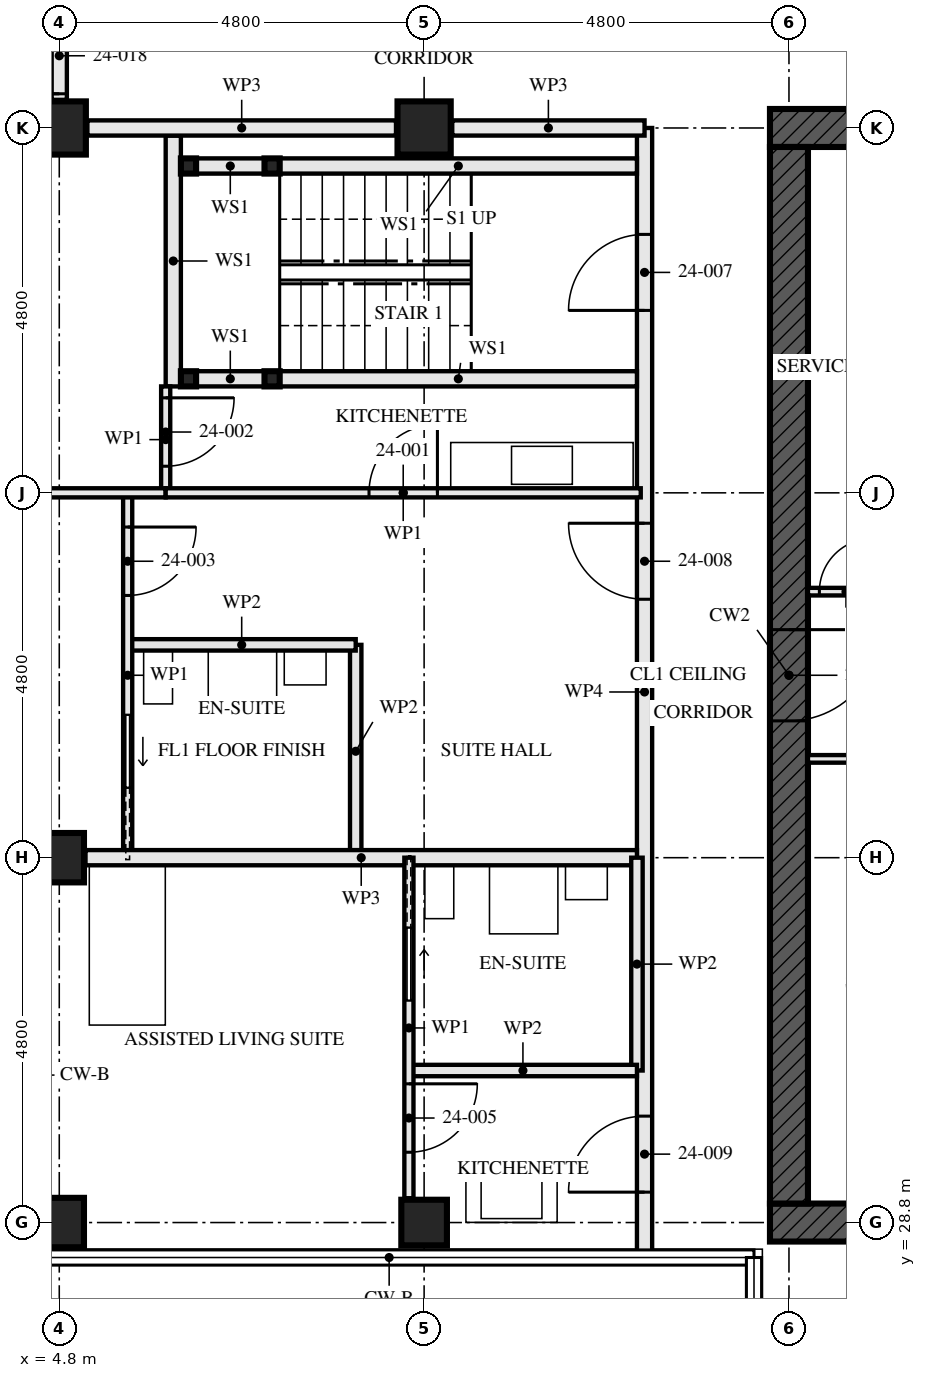
"""IFC4 building model, lengths in metres.
Left out: names, types, materials, properties, quantities, classifications, styles, units other than length and angle.
Written with IfcOpenShell. Run it as: python <this file> out.ifc"""

import sys

from ifc_helpers import new_model, si_unit, direction, frame, frame_2d, origin, origin_2d, place, context, subcontext, project, spatial, rectangle, hollow_rectangle, extrude, element, fill, save


model = new_model("IFC4")
c1 = context("Model", 3, precision=1e-05, world=origin(), true_north=direction((0.0, 1.0)))
c2 = subcontext(c1, "Body", "Model", "MODEL_VIEW")
j1 = project(units=[si_unit("LENGTHUNIT", "METRE"), si_unit("PLANEANGLEUNIT", "RADIAN")], contexts=[c1])
p1 = place(None, origin())
s1 = spatial("IfcSite", under=j1, at=p1, CompositionType="ELEMENT")
p2 = place(p1, origin())
s2 = spatial("IfcBuilding", under=s1, at=p2, CompositionType="ELEMENT")
p3 = place(p2, frame((0.0, 0.0, 91.0)))
s3 = spatial("IfcBuildingStorey", under=s2, at=p3, CompositionType="ELEMENT", Elevation=91.0)
for number, where, z_axis, x_axis in (
    (1, (4.8, 28.8, 0.0), (0.0, 0.0, 1.0), (0.0, 1.0, 0.0)),
    (2, (4.8, 33.6, 0.0), (0.0, 0.0, 1.0), (0.0, 1.0, 0.0)),
):
    element("IfcColumn", number, at=place(p3, frame(where, z_axis=z_axis, x_axis=x_axis)), inside=s3, PredefinedType="COLUMN", context=c2, shape_type="SweptSolid", body=[
        extrude(hollow_rectangle(XDim=0.65, YDim=0.65, WallThickness=0.08, at=origin_2d()), origin(), (0.0, 0.0, 1.0), 3.5),
    ])
p4 = place(p3, frame((4.8, 43.2, 0.0), z_axis=(0.0, 0.0, 1.0), x_axis=(0.0, 1.0, 0.0)))
e3 = element("IfcColumn", 3, at=p4, inside=s3, PredefinedType="COLUMN", context=c2, shape_type="SweptSolid", body=[
    extrude(hollow_rectangle(XDim=0.7, YDim=0.7, WallThickness=0.06, at=origin_2d()), origin(), (0.0, 0.0, 1.0), 3.5),
])
p5 = place(p3, frame((9.6, 28.8, 0.0), z_axis=(0.0, 0.0, 1.0), x_axis=(0.0, 1.0, 0.0)))
e4 = element("IfcColumn", 4, at=p5, inside=s3, PredefinedType="COLUMN", context=c2, shape_type="SweptSolid", body=[
    extrude(hollow_rectangle(XDim=0.6, YDim=0.6, WallThickness=0.08, at=origin_2d()), origin(), (0.0, 0.0, 1.0), 3.5),
])
p6 = place(p3, frame((9.6, 43.2, 0.0), z_axis=(0.0, 0.0, 1.0), x_axis=(0.0, 1.0, 0.0)))
e5 = element("IfcColumn", 5, at=p6, inside=s3, PredefinedType="COLUMN", context=c2, shape_type="SweptSolid", body=[
    extrude(hollow_rectangle(XDim=0.7, YDim=0.7, WallThickness=0.06, at=origin_2d()), origin(), (0.0, 0.0, 1.0), 3.5),
])
p7 = place(p3, frame((14.15, 28.8, -0.17), z_axis=(0.0, 0.0, 1.0), x_axis=(1.0, 0.0, 0.0)))
e6 = element("IfcWall", 6, at=p7, inside=s3, PredefinedType="SHEAR", context=c2, shape_type="SweptSolid", body=[
    extrude(rectangle(XDim=14.9, YDim=0.5, at=frame_2d((7.45, 0.0))), origin(), (0.0, 0.0, 1.0), 3.5),
])
p8 = place(p7, frame((6.85, 0.0, 0.17)))
e7 = element("IfcOpeningElement", 7, at=p8, cuts=e6, PredefinedType="OPENING", context=c2, shape_type="SweptSolid", body=[
    extrude(rectangle(XDim=1.2, YDim=2.1, at=frame_2d((0.6, 1.05))), frame((0.0, 0.26, 0.0), z_axis=(0.0, -1.0, 0.0), x_axis=(1.0, 0.0, 0.0)), (0.0, 0.0, 1.0), 0.521),
])
p9 = place(p3, frame((29.05, 43.2, -0.17), z_axis=(0.0, 0.0, 1.0), x_axis=(-1.0, 0.0, 0.0)))
e8 = element("IfcWall", 8, at=p9, inside=s3, PredefinedType="SHEAR", context=c2, shape_type="SweptSolid", body=[
    extrude(rectangle(XDim=14.9, YDim=0.5, at=frame_2d((7.45, 0.0))), origin(), (0.0, 0.0, 1.0), 3.5),
])
p10 = place(p9, frame((6.85, 0.0, 0.17)))
e9 = element("IfcOpeningElement", 9, at=p10, cuts=e8, PredefinedType="OPENING", context=c2, shape_type="SweptSolid", body=[
    extrude(rectangle(XDim=1.2, YDim=2.1, at=frame_2d((0.6, 1.05))), frame((0.0, 0.26, 0.0), z_axis=(0.0, -1.0, 0.0), x_axis=(1.0, 0.0, 0.0)), (0.0, 0.0, 1.0), 0.521),
])
p11 = place(p3, frame((14.4, 42.95, -0.17), z_axis=(0.0, 0.0, 1.0), x_axis=(0.0, -1.0, 0.0)))
e10 = element("IfcWall", 10, at=p11, inside=s3, PredefinedType="SHEAR", context=c2, shape_type="SweptSolid", body=[
    extrude(rectangle(XDim=13.9, YDim=0.5, at=frame_2d((6.95, 0.0))), origin(), (0.0, 0.0, 1.0), 3.5),
])
p12 = place(p11, frame((6.35, 0.0, 0.17)))
e11 = element("IfcOpeningElement", 11, at=p12, cuts=e10, PredefinedType="OPENING", context=c2, shape_type="SweptSolid", body=[
    extrude(rectangle(XDim=1.2, YDim=2.1, at=frame_2d((0.6, 1.05))), frame((0.0, 0.26, 0.0), z_axis=(0.0, -1.0, 0.0), x_axis=(1.0, 0.0, 0.0)), (0.0, 0.0, 1.0), 0.521),
])
for number, where, z_axis, x_axis in (
    (12, (6.5, 42.7, 0.0), (0.0, 0.0, 1.0), (1.0, 0.0, 0.0)),
    (13, (6.5, 39.9, 0.0), (0.0, 0.0, 1.0), (1.0, 0.0, 0.0)),
    (14, (7.6, 42.7, 0.0), (0.0, 0.0, 1.0), (1.0, 0.0, 0.0)),
    (15, (7.6, 39.9, 0.0), (0.0, 0.0, 1.0), (1.0, 0.0, 0.0)),
):
    element("IfcColumn", number, at=place(p3, frame(where, z_axis=z_axis, x_axis=x_axis)), inside=s3, PredefinedType="COLUMN", context=c2, shape_type="SweptSolid", body=[
        extrude(hollow_rectangle(XDim=0.2, YDim=0.2, WallThickness=0.008, at=origin_2d()), origin(), (0.0, 0.0, 1.0), 3.33),
    ])
p13 = place(p3, frame((6.6, 42.7, 0.0), z_axis=(0.0, 0.0, 1.0), x_axis=(1.0, 0.0, 0.0)))
e16 = element("IfcWall", 16, at=p13, inside=s3, PredefinedType="SOLIDWALL", context=c2, shape_type="SweptSolid", body=[
    extrude(rectangle(XDim=0.9, YDim=0.2, at=frame_2d((0.45, 0.0))), origin(), (0.0, 0.0, 1.0), 2.99),
])
p14 = place(p3, frame((7.7, 42.7, 0.0), z_axis=(0.0, 0.0, 1.0), x_axis=(1.0, 0.0, 0.0)))
e17 = element("IfcWall", 17, at=p14, inside=s3, PredefinedType="SOLIDWALL", context=c2, shape_type="SweptSolid", body=[
    extrude(rectangle(XDim=4.7, YDim=0.2, at=frame_2d((2.35, 0.0))), origin(), (0.0, 0.0, 1.0), 2.99),
])
p15 = place(p3, frame((6.6, 39.9, 0.0), z_axis=(0.0, 0.0, 1.0), x_axis=(1.0, 0.0, 0.0)))
e18 = element("IfcWall", 18, at=p15, inside=s3, PredefinedType="SOLIDWALL", context=c2, shape_type="SweptSolid", body=[
    extrude(rectangle(XDim=0.9, YDim=0.2, at=frame_2d((0.45, 0.0))), origin(), (0.0, 0.0, 1.0), 2.99),
])
p16 = place(p3, frame((7.7, 39.9, 0.0), z_axis=(0.0, 0.0, 1.0), x_axis=(1.0, 0.0, 0.0)))
e19 = element("IfcWall", 19, at=p16, inside=s3, PredefinedType="SOLIDWALL", context=c2, shape_type="SweptSolid", body=[
    extrude(rectangle(XDim=4.7, YDim=0.2, at=frame_2d((2.35, 0.0))), origin(), (0.0, 0.0, 1.0), 2.99),
])
p17 = place(p3, frame((6.3, 43.1, 0.0), z_axis=(0.0, 0.0, 1.0), x_axis=(0.0, -1.0, 0.0)))
e20 = element("IfcWall", 20, at=p17, inside=s3, PredefinedType="SOLIDWALL", context=c2, shape_type="SweptSolid", body=[
    extrude(rectangle(XDim=3.3, YDim=0.2, at=frame_2d((1.65, 0.0))), origin(), (0.0, 0.0, 1.0), 3.33),
])
p18 = place(p3, frame((5.7, 36.4, 0.0), z_axis=(0.0, 0.0, 1.0), x_axis=(1.0, 0.0, 0.0)))
e21 = element("IfcWall", 21, at=p18, inside=s3, PredefinedType="PARTITIONING", context=c2, shape_type="SweptSolid", body=[
    extrude(rectangle(XDim=3.0, YDim=0.15, at=frame_2d((1.5, 0.0))), origin(), (0.0, 0.0, 1.0), 3.33),
])
p19 = place(p3, frame((8.7, 36.4, 0.0), z_axis=(0.0, 0.0, 1.0), x_axis=(0.0, -1.0, 0.0)))
e22 = element("IfcWall", 22, at=p19, inside=s3, PredefinedType="PARTITIONING", context=c2, shape_type="SweptSolid", body=[
    extrude(rectangle(XDim=2.8, YDim=0.15, at=frame_2d((1.4, 0.0))), origin(), (0.0, 0.0, 1.0), 3.33),
])
p20 = place(p3, frame((6.2, 38.4, 0.0), z_axis=(0.0, 0.0, 1.0), x_axis=(1.0, 0.0, 0.0)))
e23 = element("IfcWall", 23, at=p20, inside=s3, PredefinedType="PARTITIONING", context=c2, shape_type="SweptSolid", body=[
    extrude(rectangle(XDim=6.25, YDim=0.12, at=frame_2d((3.125, 0.0))), origin(), (0.0, 0.0, 1.0), 2.55),
])
p21 = place(p20, frame((2.675, 0.0, 0.0)))
e24 = element("IfcOpeningElement", 24, at=p21, cuts=e23, PredefinedType="OPENING", context=c2, shape_type="SweptSolid", body=[
    extrude(rectangle(XDim=0.9, YDim=2.1, at=frame_2d((0.45, 1.05))), frame((0.0, 0.071, 0.0), z_axis=(0.0, -1.0, 0.0), x_axis=(1.0, 0.0, 0.0)), (0.0, 0.0, 1.0), 0.141),
])
p22 = place(p3, frame((6.2, 39.8, 0.0), z_axis=(0.0, 0.0, 1.0), x_axis=(0.0, -1.0, 0.0)))
e25 = element("IfcWall", 25, at=p22, inside=s3, PredefinedType="PARTITIONING", context=c2, shape_type="SweptSolid", body=[
    extrude(rectangle(XDim=1.4, YDim=0.12, at=frame_2d((0.7, 0.0))), origin(), (0.0, 0.0, 1.0), 3.33),
])
p23 = place(p22, frame((0.15, 0.0, 0.0)))
e26 = element("IfcOpeningElement", 26, at=p23, cuts=e25, PredefinedType="OPENING", context=c2, shape_type="SweptSolid", body=[
    extrude(rectangle(XDim=0.9, YDim=2.1, at=frame_2d((0.45, 1.05))), frame((0.0, 0.071, 0.0), z_axis=(0.0, -1.0, 0.0), x_axis=(1.0, 0.0, 0.0)), (0.0, 0.0, 1.0), 0.141),
])
p24 = place(p3, frame((5.7, 38.4, 0.0), z_axis=(0.0, 0.0, 1.0), x_axis=(0.0, -1.0, 0.0)))
e27 = element("IfcWall", 27, at=p24, inside=s3, PredefinedType="PARTITIONING", context=c2, shape_type="SweptSolid", body=[
    extrude(rectangle(XDim=4.8, YDim=0.12, at=frame_2d((2.4, 0.0))), origin(), (0.0, 0.0, 1.0), 3.33),
])
p25 = place(p24, frame((0.45, 0.0, 0.0)))
e28 = element("IfcOpeningElement", 28, at=p25, cuts=e27, PredefinedType="OPENING", context=c2, shape_type="SweptSolid", body=[
    extrude(rectangle(XDim=0.9, YDim=2.1, at=frame_2d((0.45, 1.05))), frame((0.0, 0.071, 0.0), z_axis=(0.0, -1.0, 0.0), x_axis=(1.0, 0.0, 0.0)), (0.0, 0.0, 1.0), 0.141),
])
p26 = place(p24, frame((2.925, 0.0, 0.0)))
e29 = element("IfcOpeningElement", 29, at=p26, cuts=e27, PredefinedType="OPENING", context=c2, shape_type="SweptSolid", body=[
    extrude(rectangle(XDim=0.95, YDim=2.1, at=frame_2d((0.475, 1.05))), frame((0.0, 0.071, 0.0), z_axis=(0.0, -1.0, 0.0), x_axis=(1.0, 0.0, 0.0)), (0.0, 0.0, 1.0), 0.141),
])
p27 = place(p3, frame((0.345, 38.4, 0.0), z_axis=(0.0, 0.0, 1.0), x_axis=(1.0, 0.0, 0.0)))
e30 = element("IfcWall", 30, at=p27, inside=s3, PredefinedType="PARTITIONING", context=c2, shape_type="SweptSolid", body=[
    extrude(rectangle(XDim=5.855, YDim=0.12, at=frame_2d((2.927, 0.0))), origin(), (0.0, 0.0, 1.0), 2.55),
])
p28 = place(p3, frame((5.145, 33.6, 0.0), z_axis=(0.0, 0.0, 1.0), x_axis=(1.0, 0.0, 0.0)))
e31 = element("IfcWall", 31, at=p28, inside=s3, PredefinedType="PARTITIONING", context=c2, shape_type="SweptSolid", body=[
    extrude(rectangle(XDim=7.255, YDim=0.2, at=frame_2d((3.627, 0.0))), origin(), (0.0, 0.0, 1.0), 2.55),
])
p29 = place(p3, frame((9.4, 30.8, 0.0), z_axis=(0.0, 0.0, 1.0), x_axis=(1.0, 0.0, 0.0)))
e32 = element("IfcWall", 32, at=p29, inside=s3, PredefinedType="PARTITIONING", context=c2, shape_type="SweptSolid", body=[
    extrude(rectangle(XDim=3.0, YDim=0.15, at=frame_2d((1.5, 0.0))), origin(), (0.0, 0.0, 1.0), 3.33),
])
p30 = place(p3, frame((12.4, 33.6, 0.0), z_axis=(0.0, 0.0, 1.0), x_axis=(0.0, -1.0, 0.0)))
e33 = element("IfcWall", 33, at=p30, inside=s3, PredefinedType="PARTITIONING", context=c2, shape_type="SweptSolid", body=[
    extrude(rectangle(XDim=2.8, YDim=0.15, at=frame_2d((1.4, 0.0))), origin(), (0.0, 0.0, 1.0), 3.33),
])
p31 = place(p3, frame((9.4, 33.6, 0.0), z_axis=(0.0, 0.0, 1.0), x_axis=(0.0, -1.0, 0.0)))
e34 = element("IfcWall", 34, at=p31, inside=s3, PredefinedType="PARTITIONING", context=c2, shape_type="SweptSolid", body=[
    extrude(rectangle(XDim=4.48, YDim=0.12, at=frame_2d((2.24, 0.0))), origin(), (0.0, 0.0, 1.0), 3.33),
])
p32 = place(p31, frame((2.975, 0.0, 0.0)))
e35 = element("IfcOpeningElement", 35, at=p32, cuts=e34, PredefinedType="OPENING", context=c2, shape_type="SweptSolid", body=[
    extrude(rectangle(XDim=0.9, YDim=2.1, at=frame_2d((0.45, 1.05))), frame((0.0, 0.071, 0.0), z_axis=(0.0, -1.0, 0.0), x_axis=(1.0, 0.0, 0.0)), (0.0, 0.0, 1.0), 0.141),
])
p33 = place(p31, frame((0.925, 0.0, 0.0)))
e36 = element("IfcOpeningElement", 36, at=p33, cuts=e34, PredefinedType="OPENING", context=c2, shape_type="SweptSolid", body=[
    extrude(rectangle(XDim=0.95, YDim=2.1, at=frame_2d((0.475, 1.05))), frame((0.0, 0.071, 0.0), z_axis=(0.0, -1.0, 0.0), x_axis=(1.0, 0.0, 0.0)), (0.0, 0.0, 1.0), 0.141),
])
p34 = place(p3, frame((12.5, 43.2, 0.0), z_axis=(0.0, 0.0, 1.0), x_axis=(0.0, -1.0, 0.0)))
e37 = element("IfcWall", 37, at=p34, inside=s3, PredefinedType="PARTITIONING", context=c2, shape_type="SweptSolid", body=[
    extrude(rectangle(XDim=14.84, YDim=0.2, at=frame_2d((7.42, 0.0))), origin(), (0.0, 0.0, 1.0), 2.32),
])
p35 = place(p34, frame((1.4, 0.0, 0.0)))
e38 = element("IfcOpeningElement", 38, at=p35, cuts=e37, PredefinedType="OPENING", context=c2, shape_type="SweptSolid", body=[
    extrude(rectangle(XDim=1.0, YDim=2.1, at=frame_2d((0.5, 1.05))), frame((0.0, 0.111, 0.0), z_axis=(0.0, -1.0, 0.0), x_axis=(1.0, 0.0, 0.0)), (0.0, 0.0, 1.0), 0.221),
])
p36 = place(p34, frame((5.2, 0.0, 0.0)))
e39 = element("IfcOpeningElement", 39, at=p36, cuts=e37, PredefinedType="OPENING", context=c2, shape_type="SweptSolid", body=[
    extrude(rectangle(XDim=1.0, YDim=2.1, at=frame_2d((0.5, 1.05))), frame((0.0, 0.111, 0.0), z_axis=(0.0, -1.0, 0.0), x_axis=(1.0, 0.0, 0.0)), (0.0, 0.0, 1.0), 0.221),
])
p37 = place(p34, frame((13.0, 0.0, 0.0)))
e40 = element("IfcOpeningElement", 40, at=p37, cuts=e37, PredefinedType="OPENING", context=c2, shape_type="SweptSolid", body=[
    extrude(rectangle(XDim=1.0, YDim=2.1, at=frame_2d((0.5, 1.05))), frame((0.0, 0.111, 0.0), z_axis=(0.0, -1.0, 0.0), x_axis=(1.0, 0.0, 0.0)), (0.0, 0.0, 1.0), 0.221),
])
p38 = place(p3, frame((4.8, 45.2, 0.0), z_axis=(0.0, 0.0, 1.0), x_axis=(0.0, -1.0, 0.0)))
e41 = element("IfcWall", 41, at=p38, inside=s3, PredefinedType="PARTITIONING", context=c2, shape_type="SweptSolid", body=[
    extrude(rectangle(XDim=1.63, YDim=0.2, at=frame_2d((0.815, 0.0))), origin(), (0.0, 0.0, 1.0), 3.33),
])
p39 = place(p38, frame((0.55, 0.0, 0.0)))
e42 = element("IfcOpeningElement", 42, at=p39, cuts=e41, PredefinedType="OPENING", context=c2, shape_type="SweptSolid", body=[
    extrude(rectangle(XDim=1.0, YDim=2.1, at=frame_2d((0.5, 1.05))), frame((0.0, 0.111, 0.0), z_axis=(0.0, -1.0, 0.0), x_axis=(1.0, 0.0, 0.0)), (0.0, 0.0, 1.0), 0.221),
])
p40 = place(p3, frame((14.65, 34.9, 0.0), z_axis=(0.0, 0.0, 1.0), x_axis=(1.0, 0.0, 0.0)))
e43 = element("IfcWall", 43, at=p40, inside=s3, PredefinedType="SOLIDWALL", context=c2, shape_type="SweptSolid", body=[
    extrude(rectangle(XDim=5.9, YDim=0.1, at=frame_2d((2.95, 0.0))), origin(), (0.0, 0.0, 1.0), 3.33),
])
p41 = place(p40, frame((1.6, 0.0, 0.0)))
e44 = element("IfcOpeningElement", 44, at=p41, cuts=e43, PredefinedType="OPENING", context=c2, shape_type="SweptSolid", body=[
    extrude(rectangle(XDim=0.7, YDim=2.1, at=frame_2d((0.35, 1.05))), frame((0.0, 0.061, 0.0), z_axis=(0.0, -1.0, 0.0), x_axis=(1.0, 0.0, 0.0)), (0.0, 0.0, 1.0), 0.121),
])
p42 = place(p3, frame((14.65, 37.1, 0.0), z_axis=(0.0, 0.0, 1.0), x_axis=(1.0, 0.0, 0.0)))
e45 = element("IfcWall", 45, at=p42, inside=s3, PredefinedType="SOLIDWALL", context=c2, shape_type="SweptSolid", body=[
    extrude(rectangle(XDim=5.9, YDim=0.1, at=frame_2d((2.95, 0.0))), origin(), (0.0, 0.0, 1.0), 3.33),
])
p43 = place(p42, frame((0.15, 0.0, 0.0)))
e46 = element("IfcOpeningElement", 46, at=p43, cuts=e45, PredefinedType="OPENING", context=c2, shape_type="SweptSolid", body=[
    extrude(rectangle(XDim=0.7, YDim=2.1, at=frame_2d((0.35, 1.05))), frame((0.0, 0.061, 0.0), z_axis=(0.0, -1.0, 0.0), x_axis=(1.0, 0.0, 0.0)), (0.0, 0.0, 1.0), 0.121),
])
p44 = place(p42, frame((1.5, 0.0, 0.0)))
e47 = element("IfcOpeningElement", 47, at=p44, cuts=e45, PredefinedType="OPENING", context=c2, shape_type="SweptSolid", body=[
    extrude(rectangle(XDim=0.9, YDim=2.1, at=frame_2d((0.45, 1.05))), frame((0.0, 0.061, 0.0), z_axis=(0.0, -1.0, 0.0), x_axis=(1.0, 0.0, 0.0)), (0.0, 0.0, 1.0), 0.121),
])
p45 = place(p3, frame((12.5, 43.2, 0.0), z_axis=(0.0, 0.0, 1.0), x_axis=(-1.0, 0.0, 0.0)))
e48 = element("IfcWall", 48, at=p45, inside=s3, PredefinedType="PARTITIONING", context=c2, shape_type="SweptSolid", body=[
    extrude(rectangle(XDim=2.53, YDim=0.2, at=frame_2d((1.265, 0.0))), origin(), (0.0, 0.0, 1.0), 2.32),
])
p46 = place(p3, frame((9.23, 43.2, 0.0), z_axis=(0.0, 0.0, 1.0), x_axis=(-1.0, 0.0, 0.0)))
e49 = element("IfcWall", 49, at=p46, inside=s3, PredefinedType="PARTITIONING", context=c2, shape_type="SweptSolid", body=[
    extrude(rectangle(XDim=4.06, YDim=0.2, at=frame_2d((2.03, 0.0))), origin(), (0.0, 0.0, 1.0), 2.32),
])
p47 = place(p21, origin())
e50 = element("IfcDoor", 50, at=p47, inside=s3, OperationType="SINGLE_SWING_LEFT", PredefinedType="DOOR", context=c2, shape_type="SweptSolid", body=[
    extrude(rectangle(XDim=0.9, YDim=2.1, at=frame_2d((0.45, 1.05))), frame((0.0, 0.022, 0.0), z_axis=(0.0, -1.0, 0.0), x_axis=(1.0, 0.0, 0.0)), (0.0, 0.0, 1.0), 0.044),
])
fill(e24, e50)
p48 = place(p23, origin())
e51 = element("IfcDoor", 51, at=p48, inside=s3, OperationType="SINGLE_SWING_RIGHT", PredefinedType="DOOR", context=c2, shape_type="SweptSolid", body=[
    extrude(rectangle(XDim=0.9, YDim=2.1, at=frame_2d((0.45, 1.05))), frame((0.0, 0.022, 0.0), z_axis=(0.0, -1.0, 0.0), x_axis=(1.0, 0.0, 0.0)), (0.0, 0.0, 1.0), 0.044),
])
fill(e26, e51)
p49 = place(p25, origin())
e52 = element("IfcDoor", 52, at=p49, inside=s3, OperationType="SINGLE_SWING_RIGHT", PredefinedType="DOOR", context=c2, shape_type="SweptSolid", body=[
    extrude(rectangle(XDim=0.9, YDim=2.1, at=frame_2d((0.45, 1.05))), frame((0.0, 0.022, 0.0), z_axis=(0.0, -1.0, 0.0), x_axis=(1.0, 0.0, 0.0)), (0.0, 0.0, 1.0), 0.044),
])
fill(e28, e52)
p50 = place(p26, origin())
e53 = element("IfcDoor", 53, at=p50, inside=s3, OperationType="SLIDING_TO_LEFT", PredefinedType="DOOR", context=c2, shape_type="SweptSolid", body=[
    extrude(rectangle(XDim=0.95, YDim=2.1, at=frame_2d((0.475, 1.05))), frame((0.0, 0.022, 0.0), z_axis=(0.0, -1.0, 0.0), x_axis=(1.0, 0.0, 0.0)), (0.0, 0.0, 1.0), 0.044),
])
fill(e29, e53)
p51 = place(p32, origin())
e54 = element("IfcDoor", 54, at=p51, inside=s3, OperationType="SINGLE_SWING_RIGHT", PredefinedType="DOOR", context=c2, shape_type="SweptSolid", body=[
    extrude(rectangle(XDim=0.9, YDim=2.1, at=frame_2d((0.45, 1.05))), frame((0.0, 0.022, 0.0), z_axis=(0.0, -1.0, 0.0), x_axis=(1.0, 0.0, 0.0)), (0.0, 0.0, 1.0), 0.044),
])
fill(e35, e54)
p52 = place(p33, origin())
e55 = element("IfcDoor", 55, at=p52, inside=s3, OperationType="SLIDING_TO_RIGHT", PredefinedType="DOOR", context=c2, shape_type="SweptSolid", body=[
    extrude(rectangle(XDim=0.95, YDim=2.1, at=frame_2d((0.475, 1.05))), frame((0.0, 0.022, 0.0), z_axis=(0.0, -1.0, 0.0), x_axis=(1.0, 0.0, 0.0)), (0.0, 0.0, 1.0), 0.044),
])
fill(e36, e55)
p53 = place(p35, frame((1.0, 0.0, 0.0), z_axis=(0.0, 0.0, 1.0), x_axis=(-1.0, 0.0, 0.0)))
e56 = element("IfcDoor", 56, at=p53, inside=s3, OperationType="SINGLE_SWING_RIGHT", PredefinedType="DOOR", context=c2, shape_type="SweptSolid", body=[
    extrude(rectangle(XDim=1.0, YDim=2.1, at=frame_2d((0.5, 1.05))), frame((0.0, 0.032, 0.0), z_axis=(0.0, -1.0, 0.0), x_axis=(1.0, 0.0, 0.0)), (0.0, 0.0, 1.0), 0.064),
])
fill(e38, e56)
p54 = place(p36, frame((1.0, 0.0, 0.0), z_axis=(0.0, 0.0, 1.0), x_axis=(-1.0, 0.0, 0.0)))
e57 = element("IfcDoor", 57, at=p54, inside=s3, OperationType="SINGLE_SWING_LEFT", PredefinedType="DOOR", context=c2, shape_type="SweptSolid", body=[
    extrude(rectangle(XDim=1.0, YDim=2.1, at=frame_2d((0.5, 1.05))), frame((0.0, 0.027, 0.0), z_axis=(0.0, -1.0, 0.0), x_axis=(1.0, 0.0, 0.0)), (0.0, 0.0, 1.0), 0.054),
])
fill(e39, e57)
p55 = place(p37, frame((1.0, 0.0, 0.0), z_axis=(0.0, 0.0, 1.0), x_axis=(-1.0, 0.0, 0.0)))
e58 = element("IfcDoor", 58, at=p55, inside=s3, OperationType="SINGLE_SWING_RIGHT", PredefinedType="DOOR", context=c2, shape_type="SweptSolid", body=[
    extrude(rectangle(XDim=1.0, YDim=2.1, at=frame_2d((0.5, 1.05))), frame((0.0, 0.027, 0.0), z_axis=(0.0, -1.0, 0.0), x_axis=(1.0, 0.0, 0.0)), (0.0, 0.0, 1.0), 0.054),
])
fill(e40, e58)
p56 = place(p39, frame((1.0, 0.0, 0.0), z_axis=(0.0, 0.0, 1.0), x_axis=(-1.0, 0.0, 0.0)))
e59 = element("IfcDoor", 59, at=p56, inside=s3, OperationType="SINGLE_SWING_RIGHT", PredefinedType="DOOR", context=c2, shape_type="SweptSolid", body=[
    extrude(rectangle(XDim=1.0, YDim=2.1, at=frame_2d((0.5, 1.05))), frame((0.0, 0.027, 0.0), z_axis=(0.0, -1.0, 0.0), x_axis=(1.0, 0.0, 0.0)), (0.0, 0.0, 1.0), 0.054),
])
fill(e42, e59)
p57 = place(p43, origin())
e60 = element("IfcDoor", 60, at=p57, inside=s3, OperationType="SINGLE_SWING_LEFT", PredefinedType="DOOR", context=c2, shape_type="SweptSolid", body=[
    extrude(rectangle(XDim=0.7, YDim=2.1, at=frame_2d((0.35, 1.05))), frame((0.0, 0.027, 0.0), z_axis=(0.0, -1.0, 0.0), x_axis=(1.0, 0.0, 0.0)), (0.0, 0.0, 1.0), 0.054),
])
fill(e46, e60)
p58 = place(p12, origin())
e61 = element("IfcDoor", 61, at=p58, inside=s3, OperationType="SINGLE_SWING_LEFT", PredefinedType="DOOR", context=c2, shape_type="SweptSolid", body=[
    extrude(rectangle(XDim=1.2, YDim=2.1, at=frame_2d((0.6, 1.05))), frame((0.0, 0.027, 0.0), z_axis=(0.0, -1.0, 0.0), x_axis=(1.0, 0.0, 0.0)), (0.0, 0.0, 1.0), 0.054),
])
fill(e11, e61)
save(model, sys.argv[1])
